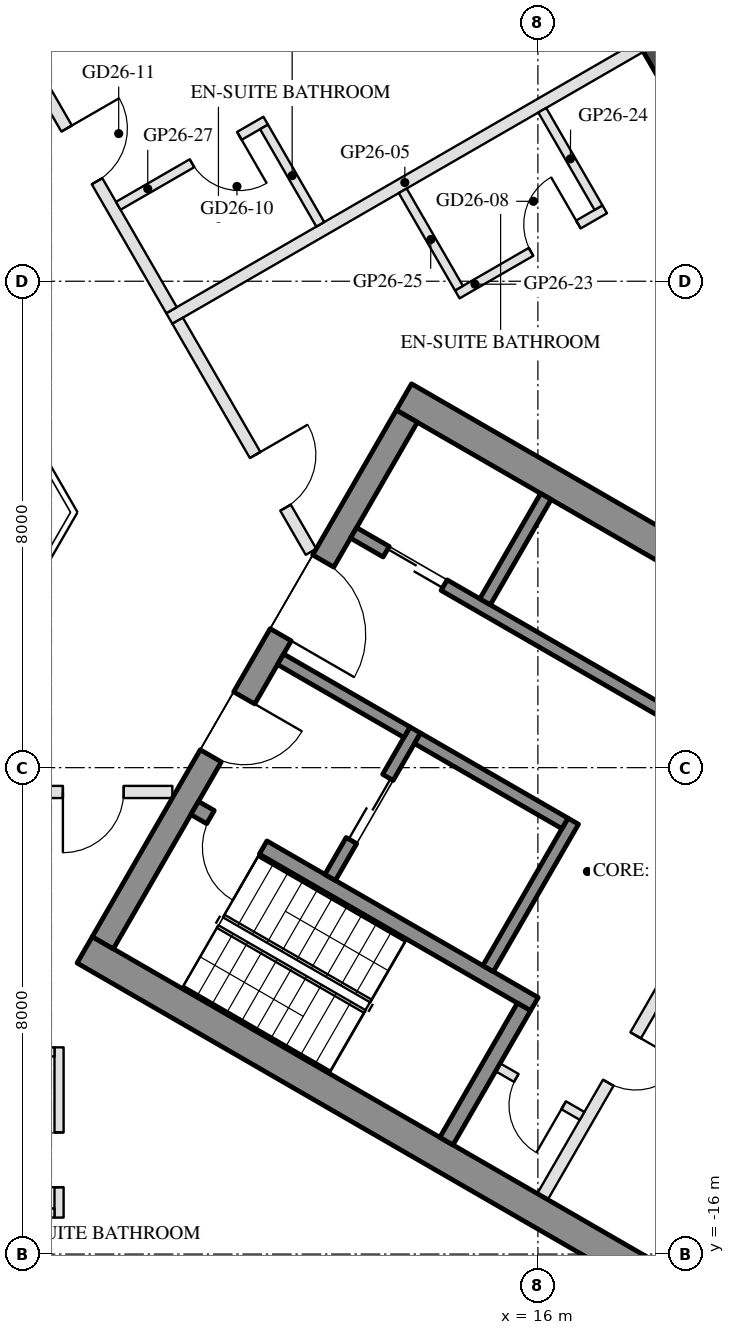
"""IFC4 building model, lengths in metres.
Left out: names, types, materials, properties, quantities, classifications, styles, units other than length and angle.
Written with IfcOpenShell. Run it as: python <this file> out.ifc"""

import sys

from ifc_helpers import new_model, si_unit, direction, frame, frame_2d, origin, place, context, subcontext, project, spatial, rectangle, extrude, element, fill, save


model = new_model("IFC4")
c1 = context("Model", 3, precision=1e-05, world=origin(), true_north=direction((0.0, 1.0)))
c2 = subcontext(c1, "Body", "Model", "MODEL_VIEW")
j1 = project(units=[si_unit("LENGTHUNIT", "METRE"), si_unit("PLANEANGLEUNIT", "RADIAN")], contexts=[c1])
p1 = place(None, origin())
s1 = spatial("IfcSite", under=j1, at=p1, CompositionType="ELEMENT")
p2 = place(p1, origin())
s2 = spatial("IfcBuilding", under=s1, at=p2, CompositionType="ELEMENT")
p3 = place(p2, frame((0.0, 0.0, 268.9)))
s3 = spatial("IfcBuildingStorey", under=s2, at=p3, CompositionType="ELEMENT", Elevation=268.9)
p4 = place(p3, frame((18.519, 2.766, 0.0), z_axis=(0.0, 0.0, 1.0), x_axis=(-0.499995993298, 0.866027717042, 0.0)))
e1 = element("IfcWall", 1, at=p4, inside=s3, PredefinedType="SOLIDWALL", context=c2, shape_type="SweptSolid", body=[
    extrude(rectangle(XDim=6.284, YDim=0.35, at=frame_2d((3.142, 0.0))), origin(), (0.0, 0.0, 1.0), 3.55),
])
p5 = place(p4, frame((1.813, 0.0, 0.0)))
e2 = element("IfcOpeningElement", 2, at=p5, cuts=e1, PredefinedType="OPENING", context=c2, shape_type="SweptSolid", body=[
    extrude(rectangle(XDim=2.4, YDim=2.4, at=frame_2d((1.2, 1.2))), frame((0.0, 0.185, 0.0), z_axis=(0.0, -1.0, 0.0), x_axis=(1.0, 0.0, 0.0)), (0.0, 0.0, 1.0), 0.37),
])
p6 = place(p4, frame((4.513, 0.0, 0.3)))
e3 = element("IfcOpeningElement", 3, at=p6, cuts=e1, PredefinedType="OPENING", context=c2, shape_type="SweptSolid", body=[
    extrude(rectangle(XDim=1.4, YDim=2.65, at=frame_2d((0.7, 1.325))), frame((0.0, 0.185, 0.0), z_axis=(0.0, -1.0, 0.0), x_axis=(1.0, 0.0, 0.0)), (0.0, 0.0, 1.0), 0.37),
])
for number, where, z_axis, x_axis in (
    (4, (8.547, -10.997, 0.0), (0.0, 0.0, 1.0), (0.866, -0.5, 0.0)),
    (5, (13.797, -1.903, 0.0), (0.0, 0.0, 1.0), (0.866, -0.5, 0.0)),
):
    element("IfcWall", number, at=place(p3, frame(where, z_axis=z_axis, x_axis=x_axis)), inside=s3, PredefinedType="SHEAR", context=c2, shape_type="SweptSolid", body=[
        extrude(rectangle(XDim=13.031, YDim=0.5, at=frame_2d((6.516, 0.0))), origin(), (0.0, 0.0, 1.0), 3.5),
    ])
p7 = place(p3, frame((8.845, -10.88, 0.0), z_axis=(0.0, 0.0, 1.0), x_axis=(0.500004234368, 0.866022959057, 0.0)))
e6 = element("IfcWall", 6, at=p7, inside=s3, PredefinedType="SHEAR", context=c2, shape_type="SweptSolid", body=[
    extrude(rectangle(XDim=10.0, YDim=0.4, at=frame_2d((5.0, 0.0))), origin(), (0.0, 0.0, 1.0), 3.5),
])
p8 = place(p7, frame((3.55, 0.0, 0.0)))
e7 = element("IfcOpeningElement", 7, at=p8, cuts=e6, PredefinedType="OPENING", context=c2, shape_type="SweptSolid", body=[
    extrude(rectangle(XDim=1.1, YDim=2.1, at=frame_2d((0.55, 1.05))), frame((0.0, 0.21, 0.0), z_axis=(0.0, -1.0, 0.0), x_axis=(1.0, 0.0, 0.0)), (0.0, 0.0, 1.0), 0.42),
])
p9 = place(p7, frame((5.85, 0.0, 0.0)))
e8 = element("IfcOpeningElement", 8, at=p9, cuts=e6, PredefinedType="OPENING", context=c2, shape_type="SweptSolid", body=[
    extrude(rectangle(XDim=1.4, YDim=2.1, at=frame_2d((0.7, 1.05))), frame((0.0, 0.21, 0.0), z_axis=(0.0, -1.0, 0.0), x_axis=(1.0, 0.0, 0.0)), (0.0, 0.0, 1.0), 0.42),
])
p10 = place(p3, frame((10.356, -8.664, 0.0), z_axis=(0.0, 0.0, 1.0), x_axis=(0.866028629588, -0.499994412703, 0.0)))
e9 = element("IfcWall", 9, at=p10, inside=s3, PredefinedType="SHEAR", context=c2, shape_type="SweptSolid", body=[
    extrude(rectangle(XDim=6.45, YDim=0.25, at=frame_2d((3.225, 0.0))), origin(), (0.0, 0.0, 1.0), 3.5),
])
p11 = place(p10, frame((0.3, 0.0, 0.0)))
e10 = element("IfcOpeningElement", 10, at=p11, cuts=e9, PredefinedType="OPENING", context=c2, shape_type="SweptSolid", body=[
    extrude(rectangle(XDim=1.0, YDim=2.1, at=frame_2d((0.5, 1.05))), frame((0.0, 0.135, 0.0), z_axis=(0.0, -1.0, 0.0), x_axis=(1.0, 0.0, 0.0)), (0.0, 0.0, 1.0), 0.27),
])
p12 = place(p3, frame((14.496, -14.143, 0.0), z_axis=(0.0, 0.0, 1.0), x_axis=(0.500062241894, 0.865989465428, 0.0)))
e11 = element("IfcWall", 11, at=p12, inside=s3, PredefinedType="SHEAR", context=c2, shape_type="SweptSolid", body=[
    extrude(rectangle(XDim=2.55, YDim=0.25, at=frame_2d((1.275, 0.0))), origin(), (0.0, 0.0, 1.0), 3.5),
])
p13 = place(p3, frame((15.181, -11.305, 0.0), z_axis=(0.0, 0.0, 1.0), x_axis=(0.49994636267, 0.866056369097, 0.0)))
e12 = element("IfcWall", 12, at=p13, inside=s3, PredefinedType="SHEAR", context=c2, shape_type="SweptSolid", body=[
    extrude(rectangle(XDim=2.8, YDim=0.2, at=frame_2d((1.4, 0.0))), origin(), (0.0, 0.0, 1.0), 3.5),
])
p14 = place(p3, frame((12.583, -9.805, 0.0), z_axis=(0.0, 0.0, 1.0), x_axis=(0.49994636267, 0.866056369097, 0.0)))
e13 = element("IfcWall", 13, at=p14, inside=s3, PredefinedType="SHEAR", context=c2, shape_type="SweptSolid", body=[
    extrude(rectangle(XDim=2.8, YDim=0.2, at=frame_2d((1.4, 0.0))), origin(), (0.0, 0.0, 1.0), 3.5),
])
p15 = place(p14, frame((0.7, 0.0, 0.0)))
e14 = element("IfcOpeningElement", 14, at=p15, cuts=e13, PredefinedType="OPENING", context=c2, shape_type="SweptSolid", body=[
    extrude(rectangle(XDim=1.2, YDim=2.1, at=frame_2d((0.6, 1.05))), frame((0.0, 0.11, 0.0), z_axis=(0.0, -1.0, 0.0), x_axis=(1.0, 0.0, 0.0)), (0.0, 0.0, 1.0), 0.22),
])
p16 = place(p3, frame((11.768, -6.217, 0.0), z_axis=(0.0, 0.0, 1.0), x_axis=(0.866050077142, -0.499957262057, 0.0)))
e15 = element("IfcWall", 15, at=p16, inside=s3, PredefinedType="SHEAR", context=c2, shape_type="SweptSolid", body=[
    extrude(rectangle(XDim=2.4, YDim=0.2, at=frame_2d((1.2, 0.0))), origin(), (0.0, 0.0, 1.0), 3.5),
])
p17 = place(p3, frame((14.02, -7.517, 0.0), z_axis=(0.0, 0.0, 1.0), x_axis=(0.866034573852, -0.49998411664, 0.0)))
e16 = element("IfcWall", 16, at=p17, inside=s3, PredefinedType="SHEAR", context=c2, shape_type="SweptSolid", body=[
    extrude(rectangle(XDim=2.8, YDim=0.2, at=frame_2d((1.4, 0.0))), origin(), (0.0, 0.0, 1.0), 3.5),
])
p18 = place(p3, frame((12.968, -4.138, 0.0), z_axis=(0.0, 0.0, 1.0), x_axis=(0.866028328073, -0.49999493495, 0.0)))
e17 = element("IfcWall", 17, at=p18, inside=s3, PredefinedType="SHEAR", context=c2, shape_type="SweptSolid", body=[
    extrude(rectangle(XDim=10.16, YDim=0.2, at=frame_2d((5.08, 0.0))), origin(), (0.0, 0.0, 1.0), 3.5),
])
p19 = place(p18, frame((0.62, 0.0, 0.0)))
e18 = element("IfcOpeningElement", 18, at=p19, cuts=e17, PredefinedType="OPENING", context=c2, shape_type="SweptSolid", body=[
    extrude(rectangle(XDim=1.1, YDim=2.1, at=frame_2d((0.55, 1.05))), frame((0.0, 0.11, 0.0), z_axis=(0.0, -1.0, 0.0), x_axis=(1.0, 0.0, 0.0)), (0.0, 0.0, 1.0), 0.22),
])
p20 = place(p18, frame((5.8, 0.0, 0.0)))
e19 = element("IfcOpeningElement", 19, at=p20, cuts=e17, PredefinedType="OPENING", context=c2, shape_type="SweptSolid", body=[
    extrude(rectangle(XDim=0.9, YDim=2.1, at=frame_2d((0.45, 1.05))), frame((0.0, 0.11, 0.0), z_axis=(0.0, -1.0, 0.0), x_axis=(1.0, 0.0, 0.0)), (0.0, 0.0, 1.0), 0.22),
])
p21 = place(p3, frame((15.131, -5.272, 0.0), z_axis=(0.0, 0.0, 1.0), x_axis=(0.499972520799, 0.866041268327, 0.0)))
e20 = element("IfcWall", 20, at=p21, inside=s3, PredefinedType="SHEAR", context=c2, shape_type="SweptSolid", body=[
    extrude(rectangle(XDim=2.0, YDim=0.2, at=frame_2d((1.0, 0.0))), origin(), (0.0, 0.0, 1.0), 3.5),
])
p22 = place(p3, frame((16.076, -15.055, 0.0), z_axis=(0.0, 0.0, 1.0), x_axis=(0.499995103361, 0.866028230842, 0.0)))
e21 = element("IfcWall", 21, at=p22, inside=s3, PredefinedType="PARTITIONING", context=c2, shape_type="SweptSolid", body=[
    extrude(rectangle(XDim=5.4, YDim=0.2, at=frame_2d((2.7, 0.0))), origin(), (0.0, 0.0, 1.0), 3.5),
])
p23 = place(p22, frame((2.163, 0.0, 0.0)))
e22 = element("IfcOpeningElement", 22, at=p23, cuts=e21, PredefinedType="OPENING", context=c2, shape_type="SweptSolid", body=[
    extrude(rectangle(XDim=0.9, YDim=2.1, at=frame_2d((0.45, 1.05))), frame((0.0, 0.11, 0.0), z_axis=(0.0, -1.0, 0.0), x_axis=(1.0, 0.0, 0.0)), (0.0, 0.0, 1.0), 0.22),
])
p24 = place(p22, frame((4.038, 0.0, 0.0)))
e23 = element("IfcOpeningElement", 23, at=p24, cuts=e21, PredefinedType="OPENING", context=c2, shape_type="SweptSolid", body=[
    extrude(rectangle(XDim=0.9, YDim=2.1, at=frame_2d((0.45, 1.05))), frame((0.0, 0.11, 0.0), z_axis=(0.0, -1.0, 0.0), x_axis=(1.0, 0.0, 0.0)), (0.0, 0.0, 1.0), 0.22),
])
p25 = place(p3, frame((15.342, -12.928, 0.0), z_axis=(0.0, 0.0, 1.0), x_axis=(0.865989903783, -0.500061482766, 0.0)))
e24 = element("IfcWall", 24, at=p25, inside=s3, PredefinedType="PARTITIONING", context=c2, shape_type="SweptSolid", body=[
    extrude(rectangle(XDim=1.6, YDim=0.15, at=frame_2d((0.8, 0.0))), origin(), (0.0, 0.0, 1.0), 3.5),
])
p26 = place(p25, frame((0.35, 0.0, 0.0)))
e25 = element("IfcOpeningElement", 25, at=p26, cuts=e24, PredefinedType="OPENING", context=c2, shape_type="SweptSolid", body=[
    extrude(rectangle(XDim=0.9, YDim=2.1, at=frame_2d((0.45, 1.05))), frame((0.0, 0.085, 0.0), z_axis=(0.0, -1.0, 0.0), x_axis=(1.0, 0.0, 0.0)), (0.0, 0.0, 1.0), 0.17),
])
p27 = place(p3, frame((17.963, -11.987, 0.0), z_axis=(0.0, 0.0, 1.0), x_axis=(0.866008903822, -0.500028577684, 0.0)))
e26 = element("IfcWall", 26, at=p27, inside=s3, PredefinedType="PARTITIONING", context=c2, shape_type="SweptSolid", body=[
    extrude(rectangle(XDim=5.293, YDim=0.15, at=frame_2d((2.646, 0.0))), origin(), (0.0, 0.0, 1.0), 3.5),
])
p28 = place(p3, frame((17.685, 3.86, 0.0), z_axis=(0.0, 0.0, 1.0), x_axis=(-0.866026066645, -0.499998851889, 0.0)))
e27 = element("IfcWall", 27, at=p28, inside=s3, PredefinedType="PARTITIONING", context=c2, shape_type="SweptSolid", body=[
    extrude(rectangle(XDim=8.946, YDim=0.2, at=frame_2d((4.473, 0.0))), origin(), (0.0, 0.0, 1.0), 3.16),
])
p29 = place(p3, frame((9.988, -8.4, 0.0), z_axis=(0.0, 0.0, 1.0), x_axis=(-1.0, 0.0, 0.0)))
e28 = element("IfcWall", 28, at=p29, inside=s3, PredefinedType="PARTITIONING", context=c2, shape_type="SweptSolid", body=[
    extrude(rectangle(XDim=3.788, YDim=0.2, at=frame_2d((1.894, 0.0))), origin(), (0.0, 0.0, 1.0), 3.0),
])
p30 = place(p29, frame((0.8, 0.0, 0.0)))
e29 = element("IfcOpeningElement", 29, at=p30, cuts=e28, PredefinedType="OPENING", context=c2, shape_type="SweptSolid", body=[
    extrude(rectangle(XDim=1.0, YDim=2.1, at=frame_2d((0.5, 1.05))), frame((0.0, 0.11, 0.0), z_axis=(0.0, -1.0, 0.0), x_axis=(1.0, 0.0, 0.0)), (0.0, 0.0, 1.0), 0.22),
])
p31 = place(p3, frame((8.125, -15.4, 0.0), z_axis=(0.0, 0.0, 1.0), x_axis=(0.0, 1.0, 0.0)))
e30 = element("IfcWall", 30, at=p31, inside=s3, PredefinedType="PARTITIONING", context=c2, shape_type="SweptSolid", body=[
    extrude(rectangle(XDim=2.8, YDim=0.15, at=frame_2d((1.4, 0.0))), origin(), (0.0, 0.0, 1.0), 3.55),
])
p32 = place(p31, frame((0.5, 0.0, 0.0)))
e31 = element("IfcOpeningElement", 31, at=p32, cuts=e30, PredefinedType="OPENING", context=c2, shape_type="SweptSolid", body=[
    extrude(rectangle(XDim=0.9, YDim=2.1, at=frame_2d((0.45, 1.05))), frame((0.0, 0.085, 0.0), z_axis=(0.0, -1.0, 0.0), x_axis=(1.0, 0.0, 0.0)), (0.0, 0.0, 1.0), 0.17),
])
for number, where, z_axis, x_axis in (
    (32, (6.2, -15.325, 0.0), (0.0, 0.0, 1.0), (1.0, 0.0, 0.0)),
    (33, (6.2, -12.675, 0.0), (0.0, 0.0, 1.0), (1.0, 0.0, 0.0)),
):
    element("IfcWall", number, at=place(p3, frame(where, z_axis=z_axis, x_axis=x_axis)), inside=s3, PredefinedType="PARTITIONING", context=c2, shape_type="SweptSolid", body=[
        extrude(rectangle(XDim=1.85, YDim=0.15, at=frame_2d((0.925, 0.0))), origin(), (0.0, 0.0, 1.0), 3.0),
    ])
p33 = place(p3, frame((10.075, -0.65, 0.0), z_axis=(0.0, 0.0, 1.0), x_axis=(0.499998569178, -0.866026229868, 0.0)))
e34 = element("IfcWall", 34, at=p33, inside=s3, PredefinedType="PARTITIONING", context=c2, shape_type="SweptSolid", body=[
    extrude(rectangle(XDim=4.388, YDim=0.2, at=frame_2d((2.194, 0.0))), origin(), (0.0, 0.0, 1.0), 3.0),
])
p34 = place(p33, frame((2.55, 0.0, 0.0)))
e35 = element("IfcOpeningElement", 35, at=p34, cuts=e34, PredefinedType="OPENING", context=c2, shape_type="SweptSolid", body=[
    extrude(rectangle(XDim=1.0, YDim=2.1, at=frame_2d((0.5, 1.05))), frame((0.0, 0.11, 0.0), z_axis=(0.0, -1.0, 0.0), x_axis=(1.0, 0.0, 0.0)), (0.0, 0.0, 1.0), 0.22),
])
p35 = place(p3, frame((14.674, -0.217, 0.0), z_axis=(0.0, 0.0, 1.0), x_axis=(0.866056369097, 0.49994636267, 0.0)))
e36 = element("IfcWall", 36, at=p35, inside=s3, PredefinedType="PARTITIONING", context=c2, shape_type="SweptSolid", body=[
    extrude(rectangle(XDim=2.8, YDim=0.15, at=frame_2d((1.4, 0.0))), origin(), (0.0, 0.0, 1.0), 3.0),
])
p36 = place(p35, frame((1.4, 0.0, 0.0)))
e37 = element("IfcOpeningElement", 37, at=p36, cuts=e36, PredefinedType="OPENING", context=c2, shape_type="SweptSolid", body=[
    extrude(rectangle(XDim=0.9, YDim=2.1, at=frame_2d((0.45, 1.05))), frame((0.0, 0.085, 0.0), z_axis=(0.0, -1.0, 0.0), x_axis=(1.0, 0.0, 0.0)), (0.0, 0.0, 1.0), 0.17),
])
p37 = place(p3, frame((16.997, 1.211, 0.0), z_axis=(0.0, 0.0, 1.0), x_axis=(-0.500042316284, 0.866000971088, 0.0)))
e38 = element("IfcWall", 38, at=p37, inside=s3, PredefinedType="PARTITIONING", context=c2, shape_type="SweptSolid", body=[
    extrude(rectangle(XDim=1.85, YDim=0.15, at=frame_2d((0.925, 0.0))), origin(), (0.0, 0.0, 1.0), 3.0),
])
p38 = place(p3, frame((14.702, -0.115, 0.0), z_axis=(0.0, 0.0, 1.0), x_axis=(-0.499985172903, 0.866033964044, 0.0)))
e39 = element("IfcWall", 39, at=p38, inside=s3, PredefinedType="PARTITIONING", context=c2, shape_type="SweptSolid", body=[
    extrude(rectangle(XDim=1.85, YDim=0.15, at=frame_2d((0.925, 0.0))), origin(), (0.0, 0.0, 1.0), 3.0),
])
p39 = place(p3, frame((6.476, 5.583, 0.0), z_axis=(0.0, 0.0, 1.0), x_axis=(0.499989243959, -0.866031613699, 0.0)))
e40 = element("IfcWall", 40, at=p39, inside=s3, PredefinedType="PARTITIONING", context=c2, shape_type="SweptSolid", body=[
    extrude(rectangle(XDim=6.997, YDim=0.2, at=frame_2d((3.499, 0.0))), origin(), (0.0, 0.0, 1.0), 3.0),
])
p40 = place(p39, frame((3.547, 0.0, 0.0)))
e41 = element("IfcOpeningElement", 41, at=p40, cuts=e40, PredefinedType="OPENING", context=c2, shape_type="SweptSolid", body=[
    extrude(rectangle(XDim=1.0, YDim=2.1, at=frame_2d((0.5, 1.05))), frame((0.0, 0.11, 0.0), z_axis=(0.0, -1.0, 0.0), x_axis=(1.0, 0.0, 0.0)), (0.0, 0.0, 1.0), 0.22),
])
p41 = place(p3, frame((11.524, 2.641, 0.0), z_axis=(0.0, 0.0, 1.0), x_axis=(-0.866018616679, -0.500011755427, 0.0)))
e42 = element("IfcWall", 42, at=p41, inside=s3, PredefinedType="PARTITIONING", context=c2, shape_type="SweptSolid", body=[
    extrude(rectangle(XDim=2.8, YDim=0.15, at=frame_2d((1.4, 0.0))), origin(), (0.0, 0.0, 1.0), 3.55),
])
p42 = place(p41, frame((0.5, 0.0, 0.0)))
e43 = element("IfcOpeningElement", 43, at=p42, cuts=e42, PredefinedType="OPENING", context=c2, shape_type="SweptSolid", body=[
    extrude(rectangle(XDim=0.9, YDim=2.1, at=frame_2d((0.45, 1.05))), frame((0.0, 0.085, 0.0), z_axis=(0.0, -1.0, 0.0), x_axis=(1.0, 0.0, 0.0)), (0.0, 0.0, 1.0), 0.17),
])
p43 = place(p3, frame((12.421, 0.936, 0.0), z_axis=(0.0, 0.0, 1.0), x_axis=(-0.500042316284, 0.866000971088, 0.0)))
e44 = element("IfcWall", 44, at=p43, inside=s3, PredefinedType="PARTITIONING", context=c2, shape_type="SweptSolid", body=[
    extrude(rectangle(XDim=1.85, YDim=0.15, at=frame_2d((0.925, 0.0))), origin(), (0.0, 0.0, 1.0), 3.0),
])
p44 = place(p15, origin())
e45 = element("IfcDoor", 45, at=p44, inside=s3, OperationType="DOUBLE_DOOR_SLIDING", PredefinedType="DOOR", context=c2, shape_type="SweptSolid", body=[
    extrude(rectangle(XDim=1.2, YDim=2.1, at=frame_2d((0.6, 1.05))), frame((0.0, 0.025, 0.0), z_axis=(0.0, -1.0, 0.0), x_axis=(1.0, 0.0, 0.0)), (0.0, 0.0, 1.0), 0.05),
])
fill(e14, e45)
p45 = place(p26, frame((0.9, 0.0, 0.0), z_axis=(0.0, 0.0, 1.0), x_axis=(-1.0, 0.0, 0.0)))
e46 = element("IfcDoor", 46, at=p45, inside=s3, OperationType="SINGLE_SWING_LEFT", PredefinedType="DOOR", context=c2, shape_type="SweptSolid", body=[
    extrude(rectangle(XDim=0.9, YDim=2.1, at=frame_2d((0.45, 1.05))), frame((0.0, 0.025, 0.0), z_axis=(0.0, -1.0, 0.0), x_axis=(1.0, 0.0, 0.0)), (0.0, 0.0, 1.0), 0.05),
])
fill(e25, e46)
p46 = place(p19, origin())
e47 = element("IfcDoor", 47, at=p46, inside=s3, OperationType="DOUBLE_DOOR_SLIDING", PredefinedType="DOOR", context=c2, shape_type="SweptSolid", body=[
    extrude(rectangle(XDim=1.1, YDim=2.1, at=frame_2d((0.55, 1.05))), frame((0.0, 0.025, 0.0), z_axis=(0.0, -1.0, 0.0), x_axis=(1.0, 0.0, 0.0)), (0.0, 0.0, 1.0), 0.05),
])
fill(e18, e47)
p47 = place(p23, frame((0.9, 0.0, 0.0), z_axis=(0.0, 0.0, 1.0), x_axis=(-1.0, 0.0, 0.0)))
e48 = element("IfcDoor", 48, at=p47, inside=s3, OperationType="SINGLE_SWING_LEFT", PredefinedType="DOOR", context=c2, shape_type="SweptSolid", body=[
    extrude(rectangle(XDim=0.9, YDim=2.1, at=frame_2d((0.45, 1.05))), frame((0.0, 0.025, 0.0), z_axis=(0.0, -1.0, 0.0), x_axis=(1.0, 0.0, 0.0)), (0.0, 0.0, 1.0), 0.05),
])
fill(e22, e48)
p48 = place(p8, frame((1.1, 0.0, 0.0), z_axis=(0.0, 0.0, 1.0), x_axis=(-1.0, 0.0, 0.0)))
e49 = element("IfcDoor", 49, at=p48, inside=s3, OperationType="SINGLE_SWING_LEFT", PredefinedType="DOOR", context=c2, shape_type="SweptSolid", body=[
    extrude(rectangle(XDim=1.1, YDim=2.1, at=frame_2d((0.55, 1.05))), frame((0.0, 0.025, 0.0), z_axis=(0.0, -1.0, 0.0), x_axis=(1.0, 0.0, 0.0)), (0.0, 0.0, 1.0), 0.05),
])
fill(e7, e49)
p49 = place(p9, frame((1.4, 0.0, 0.0), z_axis=(0.0, 0.0, 1.0), x_axis=(-1.0, 0.0, 0.0)))
e50 = element("IfcDoor", 50, at=p49, inside=s3, OperationType="DOUBLE_DOOR_SINGLE_SWING", PredefinedType="DOOR", context=c2, shape_type="SweptSolid", body=[
    extrude(rectangle(XDim=1.4, YDim=2.1, at=frame_2d((0.7, 1.05))), frame((0.0, 0.025, 0.0), z_axis=(0.0, -1.0, 0.0), x_axis=(1.0, 0.0, 0.0)), (0.0, 0.0, 1.0), 0.05),
])
fill(e8, e50)
p50 = place(p11, frame((1.0, 0.0, 0.0), z_axis=(0.0, 0.0, 1.0), x_axis=(-1.0, 0.0, 0.0)))
e51 = element("IfcDoor", 51, at=p50, inside=s3, OperationType="SINGLE_SWING_LEFT", PredefinedType="DOOR", context=c2, shape_type="SweptSolid", body=[
    extrude(rectangle(XDim=1.0, YDim=2.1, at=frame_2d((0.5, 1.05))), frame((0.0, 0.025, 0.0), z_axis=(0.0, -1.0, 0.0), x_axis=(1.0, 0.0, 0.0)), (0.0, 0.0, 1.0), 0.05),
])
fill(e10, e51)
p51 = place(p32, origin())
e52 = element("IfcDoor", 52, at=p51, inside=s3, OperationType="SINGLE_SWING_LEFT", PredefinedType="DOOR", context=c2, shape_type="SweptSolid", body=[
    extrude(rectangle(XDim=0.9, YDim=2.1, at=frame_2d((0.45, 1.05))), frame((0.0, 0.025, 0.0), z_axis=(0.0, -1.0, 0.0), x_axis=(1.0, 0.0, 0.0)), (0.0, 0.0, 1.0), 0.05),
])
fill(e31, e52)
p52 = place(p30, origin())
e53 = element("IfcDoor", 53, at=p52, inside=s3, OperationType="SINGLE_SWING_RIGHT", PredefinedType="DOOR", context=c2, shape_type="SweptSolid", body=[
    extrude(rectangle(XDim=1.0, YDim=2.1, at=frame_2d((0.5, 1.05))), frame((0.0, 0.025, 0.0), z_axis=(0.0, -1.0, 0.0), x_axis=(1.0, 0.0, 0.0)), (0.0, 0.0, 1.0), 0.05),
])
fill(e29, e53)
p53 = place(p36, origin())
e54 = element("IfcDoor", 54, at=p53, inside=s3, OperationType="SINGLE_SWING_RIGHT", PredefinedType="DOOR", context=c2, shape_type="SweptSolid", body=[
    extrude(rectangle(XDim=0.9, YDim=2.1, at=frame_2d((0.45, 1.05))), frame((0.0, 0.025, 0.0), z_axis=(0.0, -1.0, 0.0), x_axis=(1.0, 0.0, 0.0)), (0.0, 0.0, 1.0), 0.05),
])
fill(e37, e54)
p54 = place(p34, origin())
e55 = element("IfcDoor", 55, at=p54, inside=s3, OperationType="SINGLE_SWING_LEFT", PredefinedType="DOOR", context=c2, shape_type="SweptSolid", body=[
    extrude(rectangle(XDim=1.0, YDim=2.1, at=frame_2d((0.5, 1.05))), frame((0.0, 0.025, 0.0), z_axis=(0.0, -1.0, 0.0), x_axis=(1.0, 0.0, 0.0)), (0.0, 0.0, 1.0), 0.05),
])
fill(e35, e55)
p55 = place(p42, origin())
e56 = element("IfcDoor", 56, at=p55, inside=s3, OperationType="SINGLE_SWING_LEFT", PredefinedType="DOOR", context=c2, shape_type="SweptSolid", body=[
    extrude(rectangle(XDim=0.9, YDim=2.1, at=frame_2d((0.45, 1.05))), frame((0.0, 0.025, 0.0), z_axis=(0.0, -1.0, 0.0), x_axis=(1.0, 0.0, 0.0)), (0.0, 0.0, 1.0), 0.05),
])
fill(e43, e56)
p56 = place(p40, origin())
e57 = element("IfcDoor", 57, at=p56, inside=s3, OperationType="SINGLE_SWING_LEFT", PredefinedType="DOOR", context=c2, shape_type="SweptSolid", body=[
    extrude(rectangle(XDim=1.0, YDim=2.1, at=frame_2d((0.5, 1.05))), frame((0.0, 0.025, 0.0), z_axis=(0.0, -1.0, 0.0), x_axis=(1.0, 0.0, 0.0)), (0.0, 0.0, 1.0), 0.05),
])
fill(e41, e57)
save(model, sys.argv[1])
